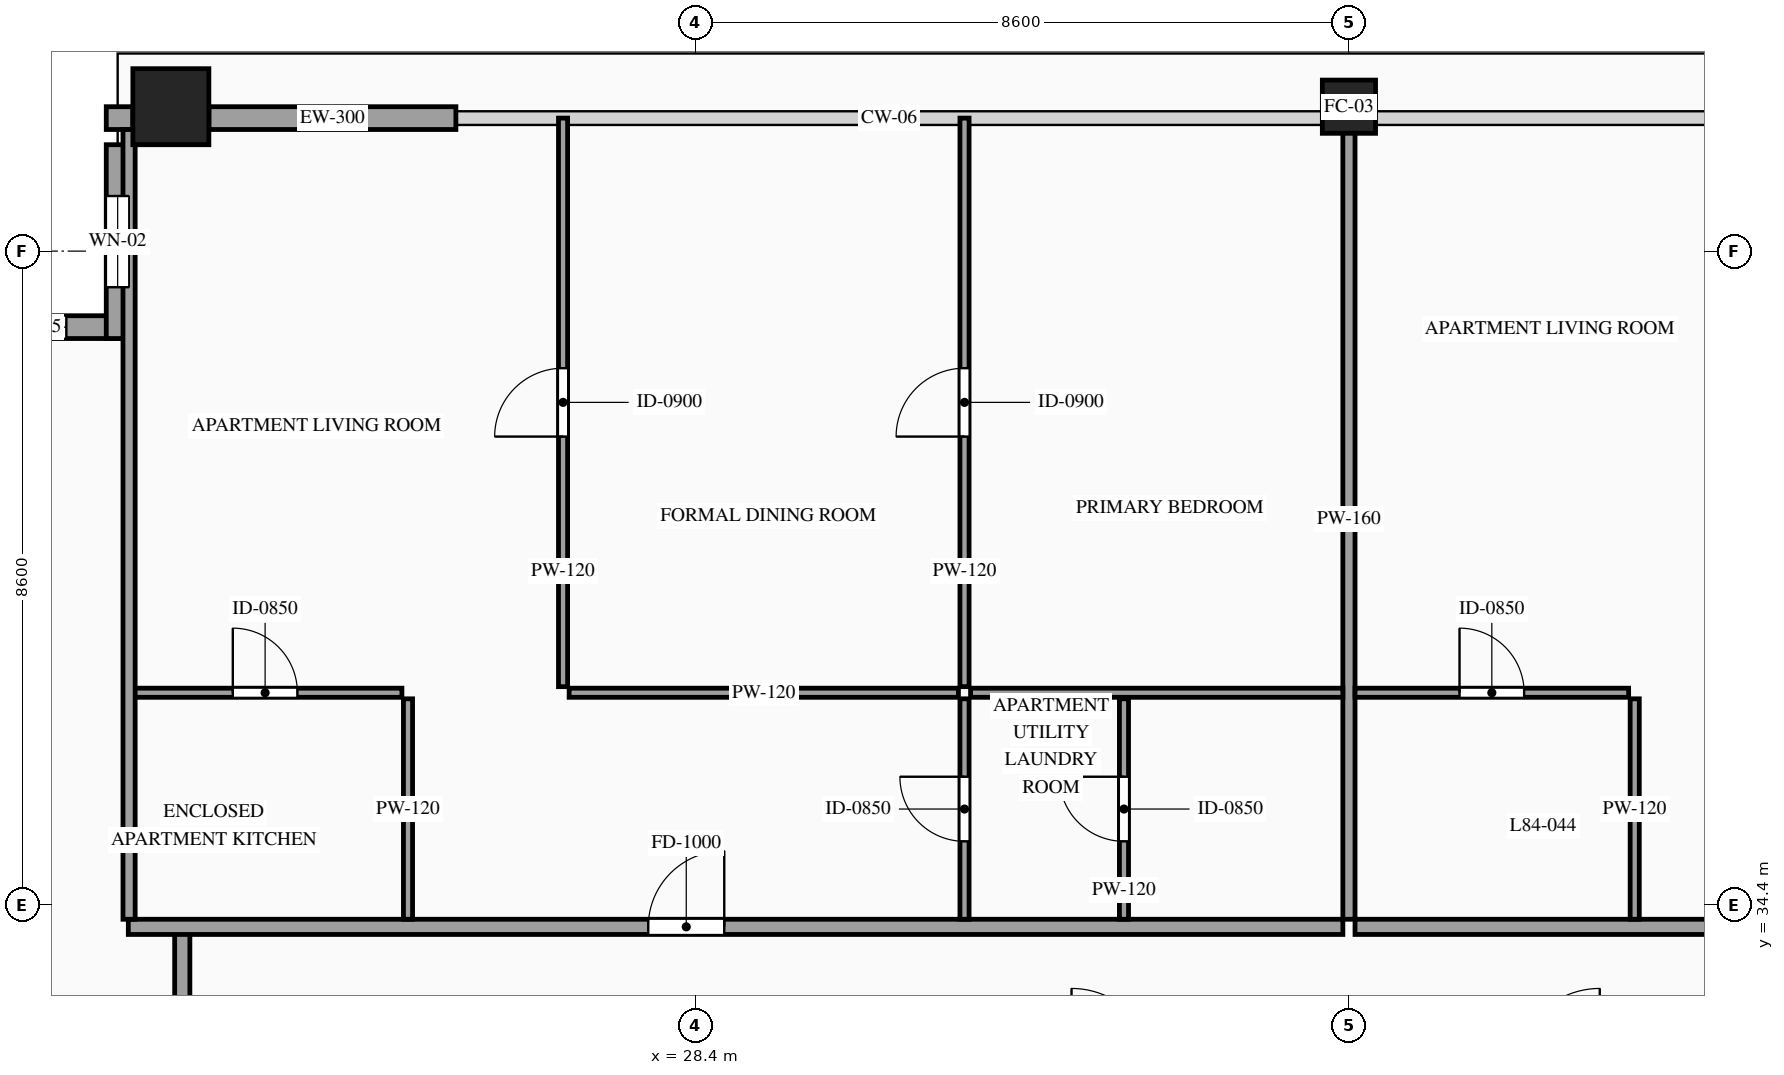
"""IFC4 building model, lengths in metres.
Left out: names, types, materials, properties, quantities, classifications, styles, units other than length and angle.
Written with IfcOpenShell. Run it as: python <this file> out.ifc"""

import sys

from ifc_helpers import new_model, si_unit, direction, frame, frame_2d, origin, origin_2d, place, context, subcontext, project, spatial, rectangle, hollow_rectangle, extrude, source, transform, mapped, element, fill, save


model = new_model("IFC4")
c1 = context("Model", 3, precision=1e-05, world=origin(), true_north=direction((0.0, 1.0)))
c2 = subcontext(c1, "Body", "Model", "MODEL_VIEW")
j1 = project(units=[si_unit("LENGTHUNIT", "METRE"), si_unit("PLANEANGLEUNIT", "RADIAN")], contexts=[c1])
p1 = place(None, origin())
s1 = spatial("IfcSite", under=j1, at=p1, CompositionType="ELEMENT")
p2 = place(p1, origin())
s2 = spatial("IfcBuilding", under=s1, at=p2, CompositionType="ELEMENT")
p3 = place(p2, frame((0.0, 0.0, 314.7)))
s3 = spatial("IfcBuildingStorey", under=s2, at=p3, CompositionType="ELEMENT", Elevation=314.7)
m1 = source(origin(), c2, "Body", "SweptSolid", [
    extrude(hollow_rectangle(XDim=1.0, YDim=1.0, WallThickness=0.048, at=origin_2d()), origin(), (0.0, 0.0, 1.0), 3.5),
])
p4 = place(p3, frame((21.5, 44.9, 0.0), z_axis=(0.0, 0.0, 1.0), x_axis=(1.0, 0.0, 0.0)))
e1 = element("IfcColumn", 1, at=p4, inside=s3, PredefinedType="COLUMN", context=c2, shape_type="MappedRepresentation", body=[
    mapped(m1, transform((0.0, 0.0, 0.0), scale=1.0)),
])
m2 = source(origin(), c2, "Body", "SweptSolid", [
    extrude(hollow_rectangle(XDim=0.7, YDim=0.7, WallThickness=0.032, at=origin_2d()), origin(), (0.0, 0.0, 1.0), 3.5),
])
p5 = place(p3, frame((37.0, 44.9, 0.0), z_axis=(0.0, 0.0, 1.0), x_axis=(1.0, 0.0, 0.0)))
e2 = element("IfcColumn", 2, at=p5, inside=s3, PredefinedType="COLUMN", context=c2, shape_type="MappedRepresentation", body=[
    mapped(m2, transform((0.0, 0.0, 0.0), scale=1.0)),
])
p6 = place(p3, frame((20.95, 42.0, 0.0), z_axis=(0.0, 0.0, 1.0), x_axis=(-1.0, 0.0, 0.0)))
e3 = element("IfcWall", 3, at=p6, inside=s3, PredefinedType="SOLIDWALL", context=c2, shape_type="SweptSolid", body=[
    extrude(rectangle(XDim=2.55, YDim=0.3, at=frame_2d((1.275, 0.0))), origin(), (0.0, 0.0, 1.0), 3.28),
])
p7 = place(p6, frame((0.825, 0.0, 0.85)))
e4 = element("IfcOpeningElement", 4, at=p7, cuts=e3, PredefinedType="OPENING", context=c2, shape_type="SweptSolid", body=[
    extrude(rectangle(XDim=0.9, YDim=1.5, at=frame_2d((0.45, 0.75))), frame((0.0, 0.165, 0.0), z_axis=(0.0, -1.0, 0.0), x_axis=(1.0, 0.0, 0.0)), (0.0, 0.0, 1.0), 0.33),
])
p8 = place(p3, frame((20.8, 44.4, 0.0), z_axis=(0.0, 0.0, 1.0), x_axis=(0.0, -1.0, 0.0)))
e5 = element("IfcWall", 5, at=p8, inside=s3, PredefinedType="SOLIDWALL", context=c2, shape_type="SweptSolid", body=[
    extrude(rectangle(XDim=2.55, YDim=0.3, at=frame_2d((1.275, 0.0))), origin(), (0.0, 0.0, 1.0), 3.28),
])
p9 = place(p8, frame((0.675, 0.0, 0.85)))
e6 = element("IfcOpeningElement", 6, at=p9, cuts=e5, PredefinedType="OPENING", context=c2, shape_type="SweptSolid", body=[
    extrude(rectangle(XDim=1.2, YDim=2.1, at=frame_2d((0.6, 1.05))), frame((0.0, 0.165, 0.0), z_axis=(0.0, -1.0, 0.0), x_axis=(1.0, 0.0, 0.0)), (0.0, 0.0, 1.0), 0.33),
])
m3 = source(origin(), c2, "Body", "SweptSolid", [
    extrude(rectangle(XDim=0.35, YDim=0.3, at=frame_2d((0.175, 0.0))), origin(), (0.0, 0.0, 1.0), 3.28),
])
p10 = place(p3, frame((20.65, 44.75, 0.0), z_axis=(0.0, 0.0, 1.0), x_axis=(1.0, 0.0, 0.0)))
e7 = element("IfcWall", 7, at=p10, inside=s3, PredefinedType="SOLIDWALL", context=c2, shape_type="MappedRepresentation", body=[
    mapped(m3, transform((0.0, 0.0, 0.0), scale=1.0)),
])
m4 = source(origin(), c2, "Body", "SweptSolid", [
    extrude(rectangle(XDim=3.25, YDim=0.3, at=frame_2d((1.625, 0.0))), origin(), (0.0, 0.0, 1.0), 2.885),
])
p11 = place(p3, frame((22.0, 44.75, 0.0), z_axis=(0.0, 0.0, 1.0), x_axis=(1.0, 0.0, 0.0)))
e8 = element("IfcWall", 8, at=p11, inside=s3, PredefinedType="SOLIDWALL", context=c2, shape_type="MappedRepresentation", body=[
    mapped(m4, transform((0.0, 0.0, 0.0), scale=1.0)),
])
m5 = source(origin(), c2, "Body", "SweptSolid", [
    extrude(rectangle(XDim=1.7, YDim=0.2, at=frame_2d((0.85, 0.0))), origin(), (0.0, 0.0, 1.0), 3.28),
])
p12 = place(p3, frame((21.65, 32.35, 0.0), z_axis=(0.0, 0.0, 1.0), x_axis=(0.0, 1.0, 0.0)))
e9 = element("IfcWall", 9, at=p12, inside=s3, PredefinedType="PARTITIONING", context=c2, shape_type="MappedRepresentation", body=[
    mapped(m5, transform((0.0, 0.0, 0.0), scale=1.0)),
])
p13 = place(p3, frame((20.94, 34.11, 0.0), z_axis=(0.0, 0.0, 1.0), x_axis=(1.0, 0.0, 0.0)))
e10 = element("IfcWall", 10, at=p13, inside=s3, PredefinedType="PARTITIONING", context=c2, shape_type="SweptSolid", body=[
    extrude(rectangle(XDim=15.98, YDim=0.2, at=frame_2d((7.99, 0.0))), origin(), (0.0, 0.0, 1.0), 3.28),
])
p14 = place(p13, frame((6.841, 0.0, 0.0)))
e11 = element("IfcOpeningElement", 11, at=p14, cuts=e10, PredefinedType="OPENING", context=c2, shape_type="SweptSolid", body=[
    extrude(rectangle(XDim=1.0, YDim=2.2, at=frame_2d((0.5, 1.1))), frame((0.0, 0.115, 0.0), z_axis=(0.0, -1.0, 0.0), x_axis=(1.0, 0.0, 0.0)), (0.0, 0.0, 1.0), 0.23),
])
m6 = source(origin(), c2, "Body", "SweptSolid", [
    extrude(rectangle(XDim=10.54, YDim=0.16, at=frame_2d((5.27, 0.0))), origin(), (0.0, 0.0, 1.0), 2.787),
])
p15 = place(p3, frame((37.0, 34.21, 0.0), z_axis=(0.0, 0.0, 1.0), x_axis=(0.0, 1.0, 0.0)))
e12 = element("IfcWall", 12, at=p15, inside=s3, PredefinedType="PARTITIONING", context=c2, shape_type="MappedRepresentation", body=[
    mapped(m6, transform((0.0, 0.0, 0.0), scale=1.0)),
])
p16 = place(p3, frame((20.94, 37.19, 0.0), z_axis=(0.0, 0.0, 1.0), x_axis=(1.0, 0.0, 0.0)))
e13 = element("IfcWall", 13, at=p16, inside=s3, PredefinedType="PARTITIONING", context=c2, shape_type="SweptSolid", body=[
    extrude(rectangle(XDim=3.6, YDim=0.12, at=frame_2d((1.8, 0.0))), origin(), (0.0, 0.0, 1.0), 3.28),
])
p17 = place(p16, frame((1.375, 0.0, 0.0)))
e14 = element("IfcOpeningElement", 14, at=p17, cuts=e13, PredefinedType="OPENING", context=c2, shape_type="SweptSolid", body=[
    extrude(rectangle(XDim=0.85, YDim=2.1, at=frame_2d((0.425, 1.05))), frame((0.0, 0.075, 0.0), z_axis=(0.0, -1.0, 0.0), x_axis=(1.0, 0.0, 0.0)), (0.0, 0.0, 1.0), 0.15),
])
m7 = source(origin(), c2, "Body", "SweptSolid", [
    extrude(rectangle(XDim=2.9, YDim=0.12, at=frame_2d((1.45, 0.0))), origin(), (0.0, 0.0, 1.0), 3.28),
])
p18 = place(p3, frame((24.62, 34.21, 0.0), z_axis=(0.0, 0.0, 1.0), x_axis=(0.0, 1.0, 0.0)))
e15 = element("IfcWall", 15, at=p18, inside=s3, PredefinedType="PARTITIONING", context=c2, shape_type="MappedRepresentation", body=[
    mapped(m7, transform((0.0, 0.0, 0.0), scale=1.0)),
])
p19 = place(p3, frame((34.04, 34.21, 0.0), z_axis=(0.0, 0.0, 1.0), x_axis=(0.0, 1.0, 0.0)))
e16 = element("IfcWall", 16, at=p19, inside=s3, PredefinedType="PARTITIONING", context=c2, shape_type="SweptSolid", body=[
    extrude(rectangle(XDim=2.9, YDim=0.12, at=frame_2d((1.45, 0.0))), origin(), (0.0, 0.0, 1.0), 3.28),
])
p20 = place(p19, frame((1.025, 0.0, 0.0)))
e17 = element("IfcOpeningElement", 17, at=p20, cuts=e16, PredefinedType="OPENING", context=c2, shape_type="SweptSolid", body=[
    extrude(rectangle(XDim=0.85, YDim=2.1, at=frame_2d((0.425, 1.05))), frame((0.0, 0.075, 0.0), z_axis=(0.0, -1.0, 0.0), x_axis=(1.0, 0.0, 0.0)), (0.0, 0.0, 1.0), 0.15),
])
m8 = source(origin(), c2, "Body", "SweptSolid", [
    extrude(rectangle(XDim=4.898, YDim=0.12, at=frame_2d((2.449, 0.0))), origin(), (0.0, 0.0, 1.0), 3.28),
])
p21 = place(p3, frame((32.022, 37.19, 0.0), z_axis=(0.0, 0.0, 1.0), x_axis=(1.0, 0.0, 0.0)))
e18 = element("IfcWall", 18, at=p21, inside=s3, PredefinedType="PARTITIONING", context=c2, shape_type="MappedRepresentation", body=[
    mapped(m8, transform((0.0, 0.0, 0.0), scale=1.0)),
])
p22 = place(p3, frame((31.942, 37.27, 0.0), z_axis=(0.0, 0.0, 1.0), x_axis=(0.0, 1.0, 0.0)))
e19 = element("IfcWall", 19, at=p22, inside=s3, PredefinedType="PARTITIONING", context=c2, shape_type="SweptSolid", body=[
    extrude(rectangle(XDim=7.48, YDim=0.12, at=frame_2d((3.74, 0.0))), origin(), (0.0, 0.0, 1.0), 3.28),
])
p23 = place(p22, frame((3.29, 0.0, 0.0)))
e20 = element("IfcOpeningElement", 20, at=p23, cuts=e19, PredefinedType="OPENING", context=c2, shape_type="SweptSolid", body=[
    extrude(rectangle(XDim=0.9, YDim=2.15, at=frame_2d((0.45, 1.075))), frame((0.0, 0.075, 0.0), z_axis=(0.0, -1.0, 0.0), x_axis=(1.0, 0.0, 0.0)), (0.0, 0.0, 1.0), 0.15),
])
p24 = place(p3, frame((31.942, 34.21, 0.0), z_axis=(0.0, 0.0, 1.0), x_axis=(0.0, 1.0, 0.0)))
e21 = element("IfcWall", 21, at=p24, inside=s3, PredefinedType="PARTITIONING", context=c2, shape_type="SweptSolid", body=[
    extrude(rectangle(XDim=2.9, YDim=0.12, at=frame_2d((1.45, 0.0))), origin(), (0.0, 0.0, 1.0), 3.28),
])
p25 = place(p24, frame((1.025, 0.0, 0.0)))
e22 = element("IfcOpeningElement", 22, at=p25, cuts=e21, PredefinedType="OPENING", context=c2, shape_type="SweptSolid", body=[
    extrude(rectangle(XDim=0.85, YDim=2.1, at=frame_2d((0.425, 1.05))), frame((0.0, 0.075, 0.0), z_axis=(0.0, -1.0, 0.0), x_axis=(1.0, 0.0, 0.0)), (0.0, 0.0, 1.0), 0.15),
])
m9 = source(origin(), c2, "Body", "SweptSolid", [
    extrude(rectangle(XDim=5.122, YDim=0.12, at=frame_2d((2.561, 0.0))), origin(), (0.0, 0.0, 1.0), 3.28),
])
p26 = place(p3, frame((26.74, 37.19, 0.0), z_axis=(0.0, 0.0, 1.0), x_axis=(1.0, 0.0, 0.0)))
e23 = element("IfcWall", 23, at=p26, inside=s3, PredefinedType="PARTITIONING", context=c2, shape_type="MappedRepresentation", body=[
    mapped(m9, transform((0.0, 0.0, 0.0), scale=1.0)),
])
p27 = place(p3, frame((26.66, 37.27, 0.0), z_axis=(0.0, 0.0, 1.0), x_axis=(0.0, 1.0, 0.0)))
e24 = element("IfcWall", 24, at=p27, inside=s3, PredefinedType="PARTITIONING", context=c2, shape_type="SweptSolid", body=[
    extrude(rectangle(XDim=7.48, YDim=0.12, at=frame_2d((3.74, 0.0))), origin(), (0.0, 0.0, 1.0), 3.28),
])
p28 = place(p27, frame((3.29, 0.0, 0.0)))
e25 = element("IfcOpeningElement", 25, at=p28, cuts=e24, PredefinedType="OPENING", context=c2, shape_type="SweptSolid", body=[
    extrude(rectangle(XDim=0.9, YDim=2.15, at=frame_2d((0.45, 1.075))), frame((0.0, 0.075, 0.0), z_axis=(0.0, -1.0, 0.0), x_axis=(1.0, 0.0, 0.0)), (0.0, 0.0, 1.0), 0.15),
])
p29 = place(p3, frame((37.08, 34.11, 0.0), z_axis=(0.0, 0.0, 1.0), x_axis=(1.0, 0.0, 0.0)))
e26 = element("IfcWall", 26, at=p29, inside=s3, PredefinedType="PARTITIONING", context=c2, shape_type="SweptSolid", body=[
    extrude(rectangle(XDim=15.98, YDim=0.2, at=frame_2d((7.99, 0.0))), origin(), (0.0, 0.0, 1.0), 3.28),
])
p30 = place(p29, frame((5.965, 0.0, 0.0)))
e27 = element("IfcOpeningElement", 27, at=p30, cuts=e26, PredefinedType="OPENING", context=c2, shape_type="SweptSolid", body=[
    extrude(rectangle(XDim=1.0, YDim=2.2, at=frame_2d((0.5, 1.1))), frame((0.0, 0.115, 0.0), z_axis=(0.0, -1.0, 0.0), x_axis=(1.0, 0.0, 0.0)), (0.0, 0.0, 1.0), 0.23),
])
m10 = source(origin(), c2, "Body", "SweptSolid", [
    extrude(rectangle(XDim=10.39, YDim=0.16, at=frame_2d((5.195, 0.0))), origin(), (0.0, 0.0, 1.0), 3.28),
])
p31 = place(p3, frame((20.95, 34.21, 0.0), z_axis=(0.0, 0.0, 1.0), x_axis=(0.0, 1.0, 0.0)))
e28 = element("IfcWall", 28, at=p31, inside=s3, PredefinedType="PARTITIONING", context=c2, shape_type="MappedRepresentation", body=[
    mapped(m10, transform((0.0, 0.0, 0.0), scale=1.0)),
])
p32 = place(p3, frame((37.08, 37.19, 0.0), z_axis=(0.0, 0.0, 1.0), x_axis=(1.0, 0.0, 0.0)))
e29 = element("IfcWall", 29, at=p32, inside=s3, PredefinedType="PARTITIONING", context=c2, shape_type="SweptSolid", body=[
    extrude(rectangle(XDim=3.6, YDim=0.12, at=frame_2d((1.8, 0.0))), origin(), (0.0, 0.0, 1.0), 3.28),
])
p33 = place(p32, frame((1.375, 0.0, 0.0)))
e30 = element("IfcOpeningElement", 30, at=p33, cuts=e29, PredefinedType="OPENING", context=c2, shape_type="SweptSolid", body=[
    extrude(rectangle(XDim=0.85, YDim=2.1, at=frame_2d((0.425, 1.05))), frame((0.0, 0.075, 0.0), z_axis=(0.0, -1.0, 0.0), x_axis=(1.0, 0.0, 0.0)), (0.0, 0.0, 1.0), 0.15),
])
p34 = place(p3, frame((40.76, 34.21, 0.0), z_axis=(0.0, 0.0, 1.0), x_axis=(0.0, 1.0, 0.0)))
e31 = element("IfcWall", 31, at=p34, inside=s3, PredefinedType="PARTITIONING", context=c2, shape_type="MappedRepresentation", body=[
    mapped(m7, transform((0.0, 0.0, 0.0), scale=1.0)),
])
m11 = source(origin(), c2, "Body", "SweptSolid", [
    extrude(rectangle(XDim=0.9, YDim=1.5, at=frame_2d((0.45, 0.75))), frame((0.0, 0.03, 0.0), z_axis=(0.0, -1.0, 0.0), x_axis=(1.0, 0.0, 0.0)), (0.0, 0.0, 1.0), 0.06),
])
p35 = place(p7, origin())
e32 = element("IfcWindow", 32, at=p35, inside=s3, PartitioningType="SINGLE_PANEL", PredefinedType="WINDOW", context=c2, shape_type="MappedRepresentation", body=[
    mapped(m11, transform((0.0, 0.0, 0.0), scale=1.0)),
])
fill(e4, e32)
m12 = source(origin(), c2, "Body", "SweptSolid", [
    extrude(rectangle(XDim=1.2, YDim=2.1, at=frame_2d((0.6, 1.05))), frame((0.0, 0.03, 0.0), z_axis=(0.0, -1.0, 0.0), x_axis=(1.0, 0.0, 0.0)), (0.0, 0.0, 1.0), 0.06),
])
p36 = place(p9, origin())
e33 = element("IfcWindow", 33, at=p36, inside=s3, PartitioningType="SINGLE_PANEL", PredefinedType="WINDOW", context=c2, shape_type="MappedRepresentation", body=[
    mapped(m12, transform((0.0, 0.0, 0.0), scale=1.0)),
])
fill(e6, e33)
m13 = source(origin(), c2, "Body", "SweptSolid", [
    extrude(rectangle(XDim=1.0, YDim=2.2, at=frame_2d((0.5, 1.1))), frame((0.0, 0.025, 0.0), z_axis=(0.0, -1.0, 0.0), x_axis=(1.0, 0.0, 0.0)), (0.0, 0.0, 1.0), 0.05),
])
p37 = place(p14, origin())
e34 = element("IfcDoor", 34, at=p37, inside=s3, OperationType="SINGLE_SWING_RIGHT", PredefinedType="DOOR", context=c2, shape_type="MappedRepresentation", body=[
    mapped(m13, transform((0.0, 0.0, 0.0), scale=1.0)),
])
fill(e11, e34)
m14 = source(origin(), c2, "Body", "SweptSolid", [
    extrude(rectangle(XDim=0.85, YDim=2.1, at=frame_2d((0.425, 1.05))), frame((0.0, 0.025, 0.0), z_axis=(0.0, -1.0, 0.0), x_axis=(1.0, 0.0, 0.0)), (0.0, 0.0, 1.0), 0.05),
])
p38 = place(p17, origin())
e35 = element("IfcDoor", 35, at=p38, inside=s3, OperationType="SINGLE_SWING_LEFT", PredefinedType="DOOR", context=c2, shape_type="MappedRepresentation", body=[
    mapped(m14, transform((0.0, 0.0, 0.0), scale=1.0)),
])
fill(e14, e35)
p39 = place(p20, origin())
e36 = element("IfcDoor", 36, at=p39, inside=s3, OperationType="SINGLE_SWING_RIGHT", PredefinedType="DOOR", context=c2, shape_type="MappedRepresentation", body=[
    mapped(m14, transform((0.0, 0.0, 0.0), scale=1.0)),
])
fill(e17, e36)
m15 = source(origin(), c2, "Body", "SweptSolid", [
    extrude(rectangle(XDim=0.9, YDim=2.15, at=frame_2d((0.45, 1.075))), frame((0.0, 0.025, 0.0), z_axis=(0.0, -1.0, 0.0), x_axis=(1.0, 0.0, 0.0)), (0.0, 0.0, 1.0), 0.05),
])
p40 = place(p23, origin())
e37 = element("IfcDoor", 37, at=p40, inside=s3, OperationType="SINGLE_SWING_LEFT", PredefinedType="DOOR", context=c2, shape_type="MappedRepresentation", body=[
    mapped(m15, transform((0.0, 0.0, 0.0), scale=1.0)),
])
fill(e20, e37)
p41 = place(p25, origin())
e38 = element("IfcDoor", 38, at=p41, inside=s3, OperationType="SINGLE_SWING_RIGHT", PredefinedType="DOOR", context=c2, shape_type="MappedRepresentation", body=[
    mapped(m14, transform((0.0, 0.0, 0.0), scale=1.0)),
])
fill(e22, e38)
p42 = place(p28, origin())
e39 = element("IfcDoor", 39, at=p42, inside=s3, OperationType="SINGLE_SWING_LEFT", PredefinedType="DOOR", context=c2, shape_type="MappedRepresentation", body=[
    mapped(m15, transform((0.0, 0.0, 0.0), scale=1.0)),
])
fill(e25, e39)
p43 = place(p33, origin())
e40 = element("IfcDoor", 40, at=p43, inside=s3, OperationType="SINGLE_SWING_LEFT", PredefinedType="DOOR", context=c2, shape_type="MappedRepresentation", body=[
    mapped(m14, transform((0.0, 0.0, 0.0), scale=1.0)),
])
fill(e30, e40)
save(model, sys.argv[1])
